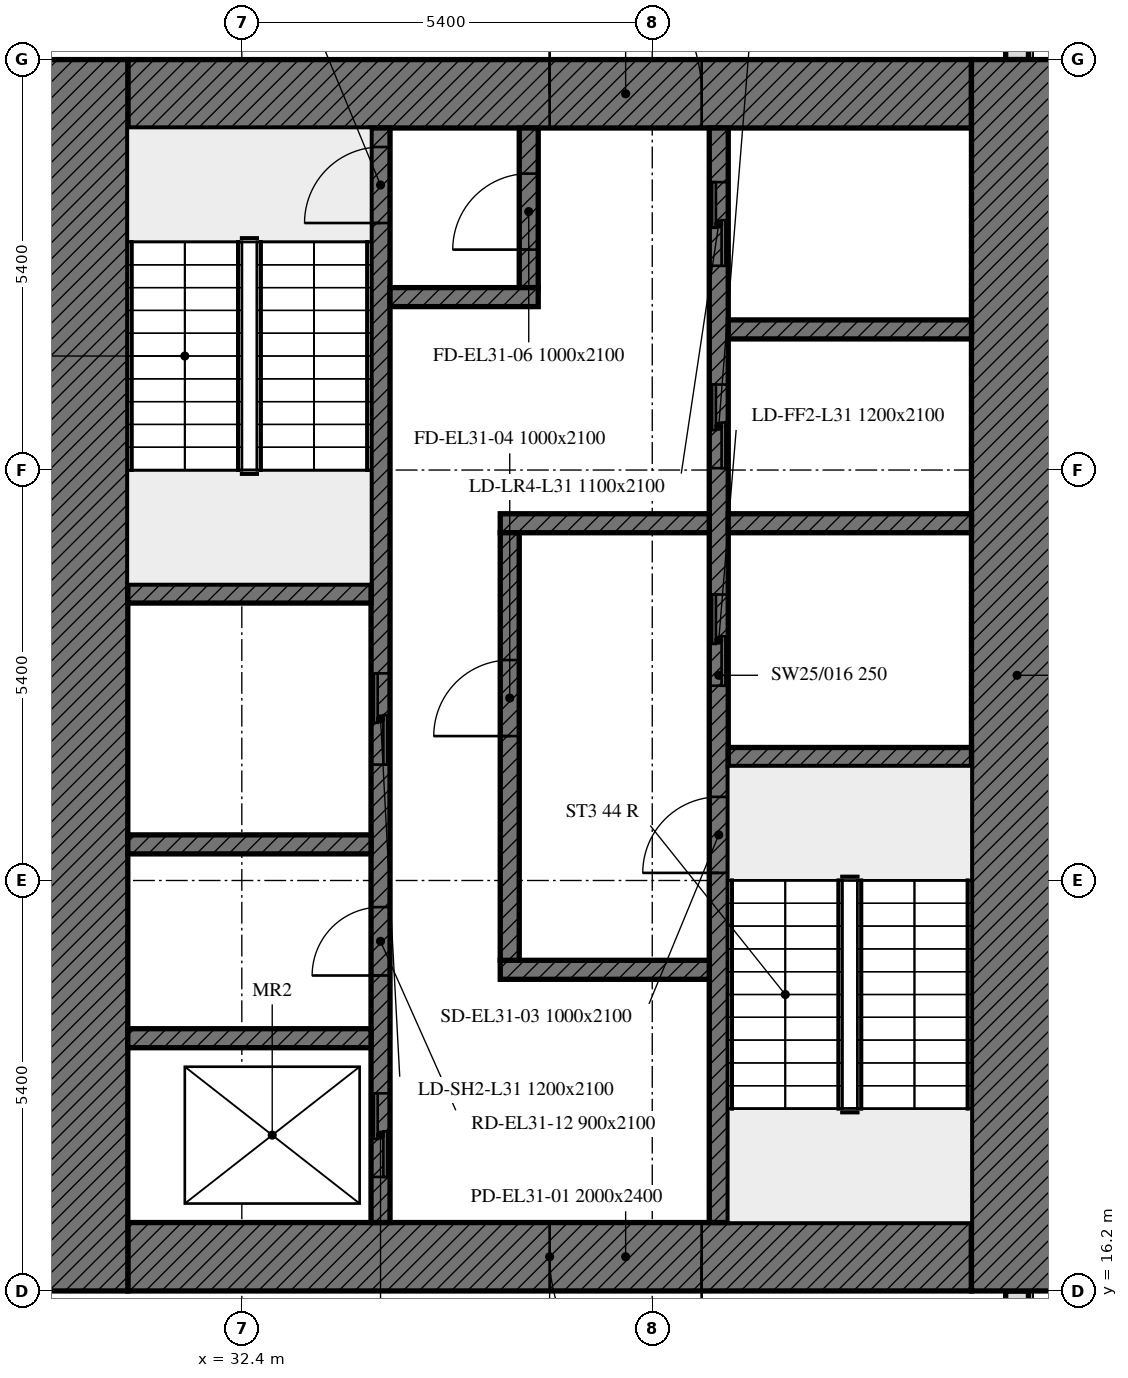
"""IFC4 building model, lengths in metres.
Left out: names, types, materials, properties, quantities, classifications, styles, units other than length and angle.
Written with IfcOpenShell. Run it as: python <this file> out.ifc"""

import sys

from ifc_helpers import new_model, si_unit, direction, frame, frame_2d, origin, place, context, subcontext, project, spatial, rectangle, extrude, element, fill, save


model = new_model("IFC4")
c1 = context("Model", 3, precision=1e-05, world=origin(), true_north=direction((0.0, 1.0)))
c2 = subcontext(c1, "Body", "Model", "MODEL_VIEW")
j1 = project(units=[si_unit("LENGTHUNIT", "METRE"), si_unit("PLANEANGLEUNIT", "RADIAN")], contexts=[c1])
p1 = place(None, origin())
s1 = spatial("IfcSite", under=j1, at=p1, CompositionType="ELEMENT")
p2 = place(p1, origin())
s2 = spatial("IfcBuilding", under=s1, at=p2, CompositionType="ELEMENT")
p3 = place(p2, frame((0.0, 0.0, 130.6)))
s3 = spatial("IfcBuildingStorey", under=s2, at=p3, CompositionType="ELEMENT", Elevation=130.6)
p4 = place(p3, frame((42.6, 10.8, 0.0), z_axis=(0.0, 0.0, 1.0), x_axis=(0.0, 1.0, 0.0)))
e1 = element("IfcWall", 1, at=p4, inside=s3, PredefinedType="SOLIDWALL", context=c2, shape_type="SweptSolid", body=[
    extrude(rectangle(XDim=5.4, YDim=0.3, at=frame_2d((2.7, 0.0))), origin(), (0.0, 0.0, 1.0), 7.5),
])
p5 = place(p4, frame((2.7, 0.0, 0.0)))
e2 = element("IfcOpeningElement", 2, at=p5, cuts=e1, PredefinedType="OPENING", context=c2, shape_type="SweptSolid", body=[
    extrude(rectangle(XDim=1.8, YDim=2.4, at=frame_2d((0.9, 1.2))), frame((0.0, 0.16, 0.0), z_axis=(0.0, -1.0, 0.0), x_axis=(1.0, 0.0, 0.0)), (0.0, 0.0, 1.0), 0.32),
])
p6 = place(p3, frame((42.6, 32.4, 0.0), z_axis=(0.0, 0.0, 1.0), x_axis=(0.0, 1.0, 0.0)))
e3 = element("IfcWall", 3, at=p6, inside=s3, PredefinedType="SOLIDWALL", context=c2, shape_type="SweptSolid", body=[
    extrude(rectangle(XDim=5.214, YDim=0.3, at=frame_2d((2.607, 0.0))), origin(), (0.0, 0.0, 1.0), 7.5),
])
p7 = place(p6, frame((1.5, 0.0, 0.0)))
e4 = element("IfcOpeningElement", 4, at=p7, cuts=e3, PredefinedType="OPENING", context=c2, shape_type="SweptSolid", body=[
    extrude(rectangle(XDim=1.2, YDim=2.4, at=frame_2d((0.6, 1.2))), frame((0.0, 0.16, 0.0), z_axis=(0.0, -1.0, 0.0), x_axis=(1.0, 0.0, 0.0)), (0.0, 0.0, 1.0), 0.32),
])
p8 = place(p3, frame((42.0, 16.65, 0.0), z_axis=(0.0, 0.0, 1.0), x_axis=(-1.0, 0.0, 0.0)))
e5 = element("IfcWall", 5, at=p8, inside=s3, PredefinedType="SOLIDWALL", context=c2, shape_type="SweptSolid", body=[
    extrude(rectangle(XDim=11.1, YDim=0.9, at=frame_2d((5.55, 0.0))), origin(), (0.0, 0.0, 1.0), 7.5),
])
p9 = place(p8, frame((3.55, 0.0, 0.0)))
e6 = element("IfcOpeningElement", 6, at=p9, cuts=e5, PredefinedType="OPENING", context=c2, shape_type="SweptSolid", body=[
    extrude(rectangle(XDim=2.0, YDim=2.4, at=frame_2d((1.0, 1.2))), frame((0.0, 0.45, 0.0), z_axis=(0.0, -1.0, 0.0), x_axis=(1.0, 0.0, 0.0)), (0.0, 0.0, 1.0), 0.9),
])
p10 = place(p3, frame((30.9, 31.95, 0.0), z_axis=(0.0, 0.0, 1.0), x_axis=(1.0, 0.0, 0.0)))
e7 = element("IfcWall", 7, at=p10, inside=s3, PredefinedType="SOLIDWALL", context=c2, shape_type="SweptSolid", body=[
    extrude(rectangle(XDim=11.1, YDim=0.9, at=frame_2d((5.55, 0.0))), origin(), (0.0, 0.0, 1.0), 7.5),
])
p11 = place(p10, frame((5.55, 0.0, 0.0)))
e8 = element("IfcOpeningElement", 8, at=p11, cuts=e7, PredefinedType="OPENING", context=c2, shape_type="SweptSolid", body=[
    extrude(rectangle(XDim=2.0, YDim=2.4, at=frame_2d((1.0, 1.2))), frame((0.0, 0.45, 0.0), z_axis=(0.0, -1.0, 0.0), x_axis=(1.0, 0.0, 0.0)), (0.0, 0.0, 1.0), 0.9),
])
for number, where, z_axis, x_axis in (
    (9, (42.6, 32.4, 0.0), (0.0, 0.0, 1.0), (0.0, -1.0, 0.0)),
    (10, (30.3, 16.2, 0.0), (0.0, 0.0, 1.0), (0.0, 1.0, 0.0)),
):
    element("IfcWall", number, at=place(p3, frame(where, z_axis=z_axis, x_axis=x_axis)), inside=s3, PredefinedType="SOLIDWALL", context=c2, shape_type="SweptSolid", body=[
        extrude(rectangle(XDim=16.2, YDim=1.2, at=frame_2d((8.1, 0.0))), origin(), (0.0, 0.0, 1.0), 7.5),
    ])
p12 = place(p3, frame((38.675, 17.1, 0.0), z_axis=(0.0, 0.0, 1.0), x_axis=(0.0, 1.0, 0.0)))
e11 = element("IfcWall", 11, at=p12, inside=s3, PredefinedType="SOLIDWALL", context=c2, shape_type="SweptSolid", body=[
    extrude(rectangle(XDim=14.4, YDim=0.25, at=frame_2d((7.2, 0.0))), origin(), (0.0, 0.0, 1.0), 7.5),
])
p13 = place(p12, frame((4.6, 0.0, 0.0)))
e12 = element("IfcOpeningElement", 12, at=p13, cuts=e11, PredefinedType="OPENING", context=c2, shape_type="SweptSolid", body=[
    extrude(rectangle(XDim=1.0, YDim=2.1, at=frame_2d((0.5, 1.05))), frame((0.0, 0.125, 0.0), z_axis=(0.0, -1.0, 0.0), x_axis=(1.0, 0.0, 0.0)), (0.0, 0.0, 1.0), 0.25),
])
p14 = place(p12, frame((7.062, 0.0, 0.0)))
e13 = element("IfcOpeningElement", 13, at=p14, cuts=e11, PredefinedType="OPENING", context=c2, shape_type="SweptSolid", body=[
    extrude(rectangle(XDim=1.2, YDim=2.1, at=frame_2d((0.6, 1.05))), frame((0.0, 0.125, 0.0), z_axis=(0.0, -1.0, 0.0), x_axis=(1.0, 0.0, 0.0)), (0.0, 0.0, 1.0), 0.25),
])
p15 = place(p12, frame((9.925, 0.0, 0.0)))
e14 = element("IfcOpeningElement", 14, at=p15, cuts=e11, PredefinedType="OPENING", context=c2, shape_type="SweptSolid", body=[
    extrude(rectangle(XDim=1.1, YDim=2.1, at=frame_2d((0.55, 1.05))), frame((0.0, 0.125, 0.0), z_axis=(0.0, -1.0, 0.0), x_axis=(1.0, 0.0, 0.0)), (0.0, 0.0, 1.0), 0.25),
])
p16 = place(p12, frame((12.587, 0.0, 0.0)))
e15 = element("IfcOpeningElement", 15, at=p16, cuts=e11, PredefinedType="OPENING", context=c2, shape_type="SweptSolid", body=[
    extrude(rectangle(XDim=1.1, YDim=2.1, at=frame_2d((0.55, 1.05))), frame((0.0, 0.125, 0.0), z_axis=(0.0, -1.0, 0.0), x_axis=(1.0, 0.0, 0.0)), (0.0, 0.0, 1.0), 0.25),
])
p17 = place(p3, frame((34.225, 17.1, 0.0), z_axis=(0.0, 0.0, 1.0), x_axis=(0.0, 1.0, 0.0)))
e16 = element("IfcWall", 16, at=p17, inside=s3, PredefinedType="SOLIDWALL", context=c2, shape_type="SweptSolid", body=[
    extrude(rectangle(XDim=14.4, YDim=0.25, at=frame_2d((7.2, 0.0))), origin(), (0.0, 0.0, 1.0), 7.5),
])
p18 = place(p17, frame((13.15, 0.0, 0.0)))
e17 = element("IfcOpeningElement", 17, at=p18, cuts=e16, PredefinedType="OPENING", context=c2, shape_type="SweptSolid", body=[
    extrude(rectangle(XDim=1.0, YDim=2.1, at=frame_2d((0.5, 1.05))), frame((0.0, 0.125, 0.0), z_axis=(0.0, -1.0, 0.0), x_axis=(1.0, 0.0, 0.0)), (0.0, 0.0, 1.0), 0.25),
])
p19 = place(p17, frame((0.6, 0.0, 0.0)))
e18 = element("IfcOpeningElement", 18, at=p19, cuts=e16, PredefinedType="OPENING", context=c2, shape_type="SweptSolid", body=[
    extrude(rectangle(XDim=1.1, YDim=2.1, at=frame_2d((0.55, 1.05))), frame((0.0, 0.125, 0.0), z_axis=(0.0, -1.0, 0.0), x_axis=(1.0, 0.0, 0.0)), (0.0, 0.0, 1.0), 0.25),
])
p20 = place(p17, frame((6.025, 0.0, 0.0)))
e19 = element("IfcOpeningElement", 19, at=p20, cuts=e16, PredefinedType="OPENING", context=c2, shape_type="SweptSolid", body=[
    extrude(rectangle(XDim=1.2, YDim=2.1, at=frame_2d((0.6, 1.05))), frame((0.0, 0.125, 0.0), z_axis=(0.0, -1.0, 0.0), x_axis=(1.0, 0.0, 0.0)), (0.0, 0.0, 1.0), 0.25),
])
p21 = place(p17, frame((3.25, 0.0, 0.0)))
e20 = element("IfcOpeningElement", 20, at=p21, cuts=e16, PredefinedType="OPENING", context=c2, shape_type="SweptSolid", body=[
    extrude(rectangle(XDim=0.9, YDim=2.1, at=frame_2d((0.45, 1.05))), frame((0.0, 0.125, 0.0), z_axis=(0.0, -1.0, 0.0), x_axis=(1.0, 0.0, 0.0)), (0.0, 0.0, 1.0), 0.25),
])
p22 = place(p3, frame((38.8, 23.225, 0.0), z_axis=(0.0, 0.0, 1.0), x_axis=(1.0, 0.0, 0.0)))
e21 = element("IfcWall", 21, at=p22, inside=s3, PredefinedType="SOLIDWALL", context=c2, shape_type="SweptSolid", body=[
    extrude(rectangle(XDim=3.2, YDim=0.25, at=frame_2d((1.6, 0.0))), origin(), (0.0, 0.0, 1.0), 7.5),
])
for number, where, z_axis, x_axis in (
    (22, (30.9, 25.375, 0.0), (0.0, 0.0, 1.0), (1.0, 0.0, 0.0)),
    (23, (30.9, 22.075, 0.0), (0.0, 0.0, 1.0), (1.0, 0.0, 0.0)),
):
    element("IfcWall", number, at=place(p3, frame(where, z_axis=z_axis, x_axis=x_axis)), inside=s3, PredefinedType="SOLIDWALL", context=c2, shape_type="SweptSolid", body=[
        extrude(rectangle(XDim=3.2, YDim=0.25, at=frame_2d((1.6, 0.0))), origin(), (0.0, 0.0, 1.0), 7.5),
    ])
p23 = place(p3, frame((38.8, 26.3, 0.0), z_axis=(0.0, 0.0, 1.0), x_axis=(1.0, 0.0, 0.0)))
e24 = element("IfcWall", 24, at=p23, inside=s3, PredefinedType="SOLIDWALL", context=c2, shape_type="SweptSolid", body=[
    extrude(rectangle(XDim=3.2, YDim=0.25, at=frame_2d((1.6, 0.0))), origin(), (0.0, 0.0, 1.0), 7.5),
])
for number, where, z_axis, x_axis in (
    (25, (35.8, 26.3, 0.0), (0.0, 0.0, 1.0), (1.0, 0.0, 0.0)),
    (26, (35.8, 20.425, 0.0), (0.0, 0.0, 1.0), (1.0, 0.0, 0.0)),
):
    element("IfcWall", number, at=place(p3, frame(where, z_axis=z_axis, x_axis=x_axis)), inside=s3, PredefinedType="SOLIDWALL", context=c2, shape_type="SweptSolid", body=[
        extrude(rectangle(XDim=2.75, YDim=0.25, at=frame_2d((1.375, 0.0))), origin(), (0.0, 0.0, 1.0), 7.5),
    ])
p24 = place(p3, frame((36.175, 29.4, 0.0), z_axis=(0.0, 0.0, 1.0), x_axis=(0.0, 1.0, 0.0)))
e27 = element("IfcWall", 27, at=p24, inside=s3, PredefinedType="SOLIDWALL", context=c2, shape_type="SweptSolid", body=[
    extrude(rectangle(XDim=2.1, YDim=0.25, at=frame_2d((1.05, 0.0))), origin(), (0.0, 0.0, 1.0), 7.5),
])
p25 = place(p24, frame((0.5, 0.0, 0.0)))
e28 = element("IfcOpeningElement", 28, at=p25, cuts=e27, PredefinedType="OPENING", context=c2, shape_type="SweptSolid", body=[
    extrude(rectangle(XDim=1.0, YDim=2.1, at=frame_2d((0.5, 1.05))), frame((0.0, 0.125, 0.0), z_axis=(0.0, -1.0, 0.0), x_axis=(1.0, 0.0, 0.0)), (0.0, 0.0, 1.0), 0.25),
])
p26 = place(p3, frame((34.35, 29.275, 0.0), z_axis=(0.0, 0.0, 1.0), x_axis=(1.0, 0.0, 0.0)))
e29 = element("IfcWall", 29, at=p26, inside=s3, PredefinedType="SOLIDWALL", context=c2, shape_type="SweptSolid", body=[
    extrude(rectangle(XDim=1.95, YDim=0.25, at=frame_2d((0.975, 0.0))), origin(), (0.0, 0.0, 1.0), 7.5),
])
p27 = place(p3, frame((35.925, 20.55, 0.0), z_axis=(0.0, 0.0, 1.0), x_axis=(0.0, 1.0, 0.0)))
e30 = element("IfcWall", 30, at=p27, inside=s3, PredefinedType="SOLIDWALL", context=c2, shape_type="SweptSolid", body=[
    extrude(rectangle(XDim=5.625, YDim=0.25, at=frame_2d((2.812, 0.0))), origin(), (0.0, 0.0, 1.0), 7.5),
])
p28 = place(p27, frame((2.95, 0.0, 0.0)))
e31 = element("IfcOpeningElement", 31, at=p28, cuts=e30, PredefinedType="OPENING", context=c2, shape_type="SweptSolid", body=[
    extrude(rectangle(XDim=1.0, YDim=2.1, at=frame_2d((0.5, 1.05))), frame((0.0, 0.125, 0.0), z_axis=(0.0, -1.0, 0.0), x_axis=(1.0, 0.0, 0.0)), (0.0, 0.0, 1.0), 0.25),
])
p29 = place(p3, frame((38.8, 28.85, 0.0), z_axis=(0.0, 0.0, 1.0), x_axis=(1.0, 0.0, 0.0)))
e32 = element("IfcWall", 32, at=p29, inside=s3, PredefinedType="SOLIDWALL", context=c2, shape_type="SweptSolid", body=[
    extrude(rectangle(XDim=3.2, YDim=0.25, at=frame_2d((1.6, 0.0))), origin(), (0.0, 0.0, 1.0), 7.5),
])
p30 = place(p3, frame((30.9, 19.525, 0.0), z_axis=(0.0, 0.0, 1.0), x_axis=(1.0, 0.0, 0.0)))
e33 = element("IfcWall", 33, at=p30, inside=s3, PredefinedType="SOLIDWALL", context=c2, shape_type="SweptSolid", body=[
    extrude(rectangle(XDim=3.2, YDim=0.25, at=frame_2d((1.6, 0.0))), origin(), (0.0, 0.0, 1.0), 7.5),
])
p31 = place(p9, origin())
e34 = element("IfcDoor", 34, at=p31, inside=s3, OperationType="DOUBLE_DOOR_SINGLE_SWING", PredefinedType="DOOR", context=c2, shape_type="SweptSolid", body=[
    extrude(rectangle(XDim=2.0, YDim=2.4, at=frame_2d((1.0, 1.2))), frame((0.0, 0.025, 0.0), z_axis=(0.0, -1.0, 0.0), x_axis=(1.0, 0.0, 0.0)), (0.0, 0.0, 1.0), 0.05),
])
fill(e6, e34)
p32 = place(p11, origin())
e35 = element("IfcDoor", 35, at=p32, inside=s3, OperationType="DOUBLE_DOOR_SINGLE_SWING", PredefinedType="DOOR", context=c2, shape_type="SweptSolid", body=[
    extrude(rectangle(XDim=2.0, YDim=2.4, at=frame_2d((1.0, 1.2))), frame((0.0, 0.025, 0.0), z_axis=(0.0, -1.0, 0.0), x_axis=(1.0, 0.0, 0.0)), (0.0, 0.0, 1.0), 0.05),
])
fill(e8, e35)
p33 = place(p13, origin())
e36 = element("IfcDoor", 36, at=p33, inside=s3, OperationType="SINGLE_SWING_LEFT", PredefinedType="DOOR", context=c2, shape_type="SweptSolid", body=[
    extrude(rectangle(XDim=1.0, YDim=2.1, at=frame_2d((0.5, 1.05))), frame((0.0, 0.025, 0.0), z_axis=(0.0, -1.0, 0.0), x_axis=(1.0, 0.0, 0.0)), (0.0, 0.0, 1.0), 0.05),
])
fill(e12, e36)
p34 = place(p28, origin())
e37 = element("IfcDoor", 37, at=p34, inside=s3, OperationType="SINGLE_SWING_LEFT", PredefinedType="DOOR", context=c2, shape_type="SweptSolid", body=[
    extrude(rectangle(XDim=1.0, YDim=2.1, at=frame_2d((0.5, 1.05))), frame((0.0, 0.025, 0.0), z_axis=(0.0, -1.0, 0.0), x_axis=(1.0, 0.0, 0.0)), (0.0, 0.0, 1.0), 0.05),
])
fill(e31, e37)
p35 = place(p18, origin())
e38 = element("IfcDoor", 38, at=p35, inside=s3, OperationType="SINGLE_SWING_LEFT", PredefinedType="DOOR", context=c2, shape_type="SweptSolid", body=[
    extrude(rectangle(XDim=1.0, YDim=2.1, at=frame_2d((0.5, 1.05))), frame((0.0, 0.025, 0.0), z_axis=(0.0, -1.0, 0.0), x_axis=(1.0, 0.0, 0.0)), (0.0, 0.0, 1.0), 0.05),
])
fill(e17, e38)
p36 = place(p25, origin())
e39 = element("IfcDoor", 39, at=p36, inside=s3, OperationType="SINGLE_SWING_LEFT", PredefinedType="DOOR", context=c2, shape_type="SweptSolid", body=[
    extrude(rectangle(XDim=1.0, YDim=2.1, at=frame_2d((0.5, 1.05))), frame((0.0, 0.025, 0.0), z_axis=(0.0, -1.0, 0.0), x_axis=(1.0, 0.0, 0.0)), (0.0, 0.0, 1.0), 0.05),
])
fill(e28, e39)
p37 = place(p14, origin())
e40 = element("IfcDoor", 40, at=p37, inside=s3, OperationType="DOUBLE_DOOR_SLIDING", PredefinedType="DOOR", context=c2, shape_type="SweptSolid", body=[
    extrude(rectangle(XDim=1.2, YDim=2.1, at=frame_2d((0.6, 1.05))), frame((0.0, 0.025, 0.0), z_axis=(0.0, -1.0, 0.0), x_axis=(1.0, 0.0, 0.0)), (0.0, 0.0, 1.0), 0.05),
])
fill(e13, e40)
p38 = place(p15, origin())
e41 = element("IfcDoor", 41, at=p38, inside=s3, OperationType="DOUBLE_DOOR_SLIDING", PredefinedType="DOOR", context=c2, shape_type="SweptSolid", body=[
    extrude(rectangle(XDim=1.1, YDim=2.1, at=frame_2d((0.55, 1.05))), frame((0.0, 0.025, 0.0), z_axis=(0.0, -1.0, 0.0), x_axis=(1.0, 0.0, 0.0)), (0.0, 0.0, 1.0), 0.05),
])
fill(e14, e41)
p39 = place(p16, origin())
e42 = element("IfcDoor", 42, at=p39, inside=s3, OperationType="DOUBLE_DOOR_SLIDING", PredefinedType="DOOR", context=c2, shape_type="SweptSolid", body=[
    extrude(rectangle(XDim=1.1, YDim=2.1, at=frame_2d((0.55, 1.05))), frame((0.0, 0.025, 0.0), z_axis=(0.0, -1.0, 0.0), x_axis=(1.0, 0.0, 0.0)), (0.0, 0.0, 1.0), 0.05),
])
fill(e15, e42)
p40 = place(p19, origin())
e43 = element("IfcDoor", 43, at=p40, inside=s3, OperationType="DOUBLE_DOOR_SLIDING", PredefinedType="DOOR", context=c2, shape_type="SweptSolid", body=[
    extrude(rectangle(XDim=1.1, YDim=2.1, at=frame_2d((0.55, 1.05))), frame((0.0, 0.025, 0.0), z_axis=(0.0, -1.0, 0.0), x_axis=(1.0, 0.0, 0.0)), (0.0, 0.0, 1.0), 0.05),
])
fill(e18, e43)
p41 = place(p20, origin())
e44 = element("IfcDoor", 44, at=p41, inside=s3, OperationType="DOUBLE_DOOR_SLIDING", PredefinedType="DOOR", context=c2, shape_type="SweptSolid", body=[
    extrude(rectangle(XDim=1.2, YDim=2.1, at=frame_2d((0.6, 1.05))), frame((0.0, 0.025, 0.0), z_axis=(0.0, -1.0, 0.0), x_axis=(1.0, 0.0, 0.0)), (0.0, 0.0, 1.0), 0.05),
])
fill(e19, e44)
p42 = place(p21, origin())
e45 = element("IfcDoor", 45, at=p42, inside=s3, OperationType="SINGLE_SWING_LEFT", PredefinedType="DOOR", context=c2, shape_type="SweptSolid", body=[
    extrude(rectangle(XDim=0.9, YDim=2.1, at=frame_2d((0.45, 1.05))), frame((0.0, 0.025, 0.0), z_axis=(0.0, -1.0, 0.0), x_axis=(1.0, 0.0, 0.0)), (0.0, 0.0, 1.0), 0.05),
])
fill(e20, e45)
save(model, sys.argv[1])
